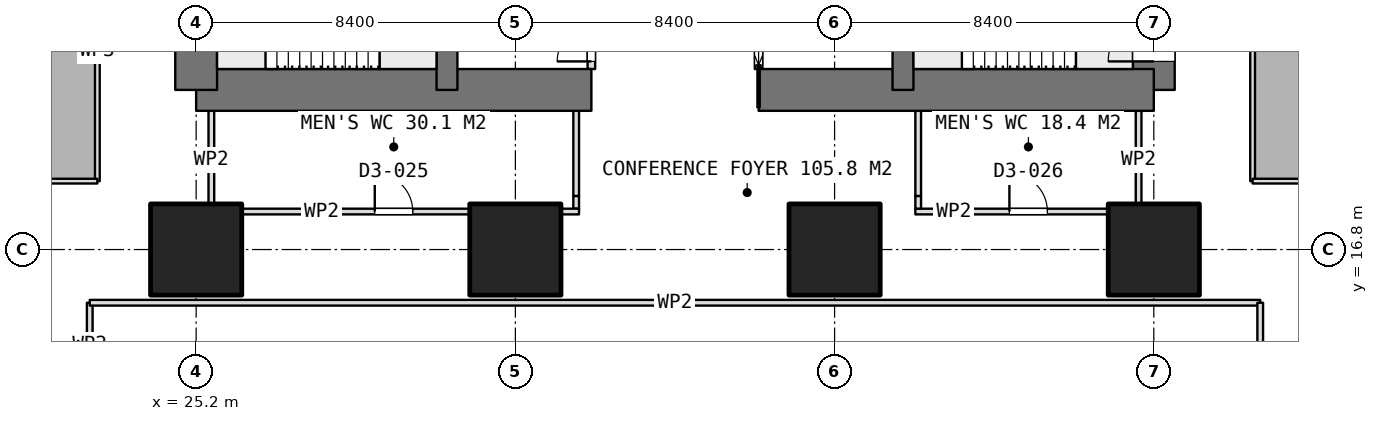
"""IFC4 building model, lengths in metres.
Left out: names, types, materials, properties, quantities, classifications, styles, units other than length and angle.
Written with IfcOpenShell. Run it as: python <this file> out.ifc"""

import sys

from ifc_helpers import new_model, si_unit, direction, frame, frame_2d, origin, origin_2d, place, context, subcontext, project, spatial, rectangle, extrude, element, fill, save


model = new_model("IFC4")
c1 = context("Model", 3, precision=1e-05, world=origin(), true_north=direction((0.0, 1.0)))
c2 = subcontext(c1, "Body", "Model", "MODEL_VIEW")
j1 = project(units=[si_unit("LENGTHUNIT", "METRE"), si_unit("PLANEANGLEUNIT", "RADIAN")], contexts=[c1])
p1 = place(None, origin())
s1 = spatial("IfcSite", under=j1, at=p1, CompositionType="ELEMENT")
p2 = place(p1, origin())
s2 = spatial("IfcBuilding", under=s1, at=p2, CompositionType="ELEMENT")
p3 = place(p2, frame((0.0, 0.0, 20.4)))
s3 = spatial("IfcBuildingStorey", under=s2, at=p3, CompositionType="ELEMENT", Elevation=20.4)
p4 = place(p3, frame((25.2, 21.0, 0.0), z_axis=(0.0, 0.0, 1.0), x_axis=(1.0, 0.0, 0.0)))
e1 = element("IfcWall", 1, at=p4, inside=s3, PredefinedType="SHEAR", context=c2, shape_type="SweptSolid", body=[
    extrude(rectangle(XDim=10.4, YDim=1.1, at=frame_2d((5.2, 0.0))), origin(), (0.0, 0.0, 1.0), 5.0),
])
p5 = place(p3, frame((40.0, 21.0, 0.0), z_axis=(0.0, 0.0, 1.0), x_axis=(1.0, 0.0, 0.0)))
e2 = element("IfcWall", 2, at=p5, inside=s3, PredefinedType="SHEAR", context=c2, shape_type="SweptSolid", body=[
    extrude(rectangle(XDim=10.4, YDim=1.1, at=frame_2d((5.2, 0.0))), origin(), (0.0, 0.0, 1.0), 5.0),
])
p6 = place(p3, frame((25.2, 21.0, 0.0), z_axis=(0.0, 0.0, 1.0), x_axis=(0.0, 1.0, 0.0)))
e3 = element("IfcWall", 3, at=p6, inside=s3, PredefinedType="SHEAR", context=c2, shape_type="SweptSolid", body=[
    extrude(rectangle(XDim=25.2, YDim=1.1, at=frame_2d((12.6, 0.0))), origin(), (0.0, 0.0, 1.0), 5.0),
])
p7 = place(p6, frame((7.8, 0.0, 0.0)))
e4 = element("IfcOpeningElement", 4, at=p7, cuts=e3, PredefinedType="OPENING", context=c2, shape_type="SweptSolid", body=[
    extrude(rectangle(XDim=1.2, YDim=2.1, at=frame_2d((0.6, 1.05))), frame((0.0, 0.56, 0.0), z_axis=(0.0, -1.0, 0.0), x_axis=(1.0, 0.0, 0.0)), (0.0, 0.0, 1.0), 1.12),
])
p8 = place(p6, frame((14.25, 0.0, 0.0)))
e5 = element("IfcOpeningElement", 5, at=p8, cuts=e3, PredefinedType="OPENING", context=c2, shape_type="SweptSolid", body=[
    extrude(rectangle(XDim=0.9, YDim=2.1, at=frame_2d((0.45, 1.05))), frame((0.0, 0.56, 0.0), z_axis=(0.0, -1.0, 0.0), x_axis=(1.0, 0.0, 0.0)), (0.0, 0.0, 1.0), 1.12),
])
p9 = place(p6, frame((16.85, 0.0, 0.0)))
e6 = element("IfcOpeningElement", 6, at=p9, cuts=e3, PredefinedType="OPENING", context=c2, shape_type="SweptSolid", body=[
    extrude(rectangle(XDim=0.9, YDim=2.1, at=frame_2d((0.45, 1.05))), frame((0.0, 0.56, 0.0), z_axis=(0.0, -1.0, 0.0), x_axis=(1.0, 0.0, 0.0)), (0.0, 0.0, 1.0), 1.12),
])
p10 = place(p6, frame((19.075, 0.0, 0.0)))
e7 = element("IfcOpeningElement", 7, at=p10, cuts=e3, PredefinedType="OPENING", context=c2, shape_type="SweptSolid", body=[
    extrude(rectangle(XDim=1.2, YDim=2.1, at=frame_2d((0.6, 1.05))), frame((0.0, 0.56, 0.0), z_axis=(0.0, -1.0, 0.0), x_axis=(1.0, 0.0, 0.0)), (0.0, 0.0, 1.0), 1.12),
])
p11 = place(p3, frame((50.4, 21.0, 0.0), z_axis=(0.0, 0.0, 1.0), x_axis=(0.0, 1.0, 0.0)))
e8 = element("IfcWall", 8, at=p11, inside=s3, PredefinedType="SHEAR", context=c2, shape_type="SweptSolid", body=[
    extrude(rectangle(XDim=25.2, YDim=1.1, at=frame_2d((12.6, 0.0))), origin(), (0.0, 0.0, 1.0), 5.0),
])
p12 = place(p11, frame((16.2, 0.0, 0.0)))
e9 = element("IfcOpeningElement", 9, at=p12, cuts=e8, PredefinedType="OPENING", context=c2, shape_type="SweptSolid", body=[
    extrude(rectangle(XDim=1.2, YDim=2.1, at=frame_2d((0.6, 1.05))), frame((0.0, 0.56, 0.0), z_axis=(0.0, -1.0, 0.0), x_axis=(1.0, 0.0, 0.0)), (0.0, 0.0, 1.0), 1.12),
])
p13 = place(p11, frame((10.05, 0.0, 0.0)))
e10 = element("IfcOpeningElement", 10, at=p13, cuts=e8, PredefinedType="OPENING", context=c2, shape_type="SweptSolid", body=[
    extrude(rectangle(XDim=0.9, YDim=2.1, at=frame_2d((0.45, 1.05))), frame((0.0, 0.56, 0.0), z_axis=(0.0, -1.0, 0.0), x_axis=(1.0, 0.0, 0.0)), (0.0, 0.0, 1.0), 1.12),
])
p14 = place(p11, frame((7.45, 0.0, 0.0)))
e11 = element("IfcOpeningElement", 11, at=p14, cuts=e8, PredefinedType="OPENING", context=c2, shape_type="SweptSolid", body=[
    extrude(rectangle(XDim=0.9, YDim=2.1, at=frame_2d((0.45, 1.05))), frame((0.0, 0.56, 0.0), z_axis=(0.0, -1.0, 0.0), x_axis=(1.0, 0.0, 0.0)), (0.0, 0.0, 1.0), 1.12),
])
p15 = place(p11, frame((0.75, 0.0, 0.0)))
e12 = element("IfcOpeningElement", 12, at=p15, cuts=e8, PredefinedType="OPENING", context=c2, shape_type="SweptSolid", body=[
    extrude(rectangle(XDim=1.2, YDim=2.1, at=frame_2d((0.6, 1.05))), frame((0.0, 0.56, 0.0), z_axis=(0.0, -1.0, 0.0), x_axis=(1.0, 0.0, 0.0)), (0.0, 0.0, 1.0), 1.12),
])
for number, where, z_axis, x_axis in (
    (13, (31.8, 21.0, 0.0), (0.0, 0.0, 1.0), (0.0, 1.0, 0.0)),
    (14, (43.8, 21.0, 0.0), (0.0, 0.0, 1.0), (0.0, 1.0, 0.0)),
):
    element("IfcWall", number, at=place(p3, frame(where, z_axis=z_axis, x_axis=x_axis)), inside=s3, PredefinedType="SHEAR", context=c2, shape_type="SweptSolid", body=[
        extrude(rectangle(XDim=25.2, YDim=0.55, at=frame_2d((12.6, 0.0))), origin(), (0.0, 0.0, 1.0), 5.0),
    ])
for number, where, z_axis, x_axis in (
    (15, (25.2, 16.8, 0.0), (0.0, 0.0, 1.0), (1.0, 0.0, 0.0)),
    (16, (33.6, 16.8, 0.0), (0.0, 0.0, 1.0), (1.0, 0.0, 0.0)),
    (17, (42.0, 16.8, 0.0), (0.0, 0.0, 1.0), (1.0, 0.0, 0.0)),
    (18, (50.4, 16.8, 0.0), (0.0, 0.0, 1.0), (1.0, 0.0, 0.0)),
):
    element("IfcColumn", number, at=place(p3, frame(where, z_axis=z_axis, x_axis=x_axis)), inside=s3, PredefinedType="COLUMN", context=c2, shape_type="SweptSolid", body=[
        extrude(rectangle(XDim=2.4, YDim=2.4, at=origin_2d()), origin(), (0.0, 0.0, 1.0), 5.0),
    ])
p16 = place(p3, frame((40.0, 21.55, 0.0), z_axis=(0.0, 0.0, 1.0), x_axis=(0.0, 1.0, 0.0)))
e19 = element("IfcWall", 19, at=p16, inside=s3, PredefinedType="PARTITIONING", context=c2, shape_type="SweptSolid", body=[
    extrude(rectangle(XDim=1.575, YDim=0.2, at=frame_2d((0.788, 0.0))), origin(), (0.0, 0.0, 1.0), 4.6),
])
p17 = place(p16, frame((0.1, 0.0, 0.0)))
e20 = element("IfcOpeningElement", 20, at=p17, cuts=e19, PredefinedType="OPENING", context=c2, shape_type="SweptSolid", body=[
    extrude(rectangle(XDim=1.1, YDim=2.1, at=frame_2d((0.55, 1.05))), frame((0.0, 0.11, 0.0), z_axis=(0.0, -1.0, 0.0), x_axis=(1.0, 0.0, 0.0)), (0.0, 0.0, 1.0), 0.22),
])
p18 = place(p3, frame((35.6, 21.55, 0.0), z_axis=(0.0, 0.0, 1.0), x_axis=(0.0, 1.0, 0.0)))
e21 = element("IfcWall", 21, at=p18, inside=s3, PredefinedType="PARTITIONING", context=c2, shape_type="SweptSolid", body=[
    extrude(rectangle(XDim=1.575, YDim=0.2, at=frame_2d((0.788, 0.0))), origin(), (0.0, 0.0, 1.0), 4.6),
])
p19 = place(p18, frame((0.2, 0.0, 0.0)))
e22 = element("IfcOpeningElement", 22, at=p19, cuts=e21, PredefinedType="OPENING", context=c2, shape_type="SweptSolid", body=[
    extrude(rectangle(XDim=0.9, YDim=2.1, at=frame_2d((0.45, 1.05))), frame((0.0, 0.11, 0.0), z_axis=(0.0, -1.0, 0.0), x_axis=(1.0, 0.0, 0.0)), (0.0, 0.0, 1.0), 0.22),
])
p20 = place(p3, frame((25.525, 17.8, 0.0), z_axis=(0.0, 0.0, 1.0), x_axis=(1.0, 0.0, 0.0)))
e23 = element("IfcWall", 23, at=p20, inside=s3, PredefinedType="PARTITIONING", context=c2, shape_type="SweptSolid", body=[
    extrude(rectangle(XDim=0.875, YDim=0.15, at=frame_2d((0.438, 0.0))), origin(), (0.0, 0.0, 1.0), 4.6),
])
p21 = place(p3, frame((26.4, 17.8, 0.0), z_axis=(0.0, 0.0, 1.0), x_axis=(1.0, 0.0, 0.0)))
e24 = element("IfcWall", 24, at=p21, inside=s3, PredefinedType="PARTITIONING", context=c2, shape_type="SweptSolid", body=[
    extrude(rectangle(XDim=6.0, YDim=0.15, at=frame_2d((3.0, 0.0))), origin(), (0.0, 0.0, 1.0), 2.8),
])
p22 = place(p21, frame((3.5, 0.0, 0.0)))
e25 = element("IfcOpeningElement", 25, at=p22, cuts=e24, PredefinedType="OPENING", context=c2, shape_type="SweptSolid", body=[
    extrude(rectangle(XDim=1.0, YDim=2.1, at=frame_2d((0.5, 1.05))), frame((0.0, 0.085, 0.0), z_axis=(0.0, -1.0, 0.0), x_axis=(1.0, 0.0, 0.0)), (0.0, 0.0, 1.0), 0.17),
])
p23 = place(p3, frame((32.4, 17.8, 0.0), z_axis=(0.0, 0.0, 1.0), x_axis=(1.0, 0.0, 0.0)))
e26 = element("IfcWall", 26, at=p23, inside=s3, PredefinedType="PARTITIONING", context=c2, shape_type="SweptSolid", body=[
    extrude(rectangle(XDim=2.4, YDim=0.15, at=frame_2d((1.2, 0.0))), origin(), (0.0, 0.0, 1.0), 4.6),
])
p24 = place(p3, frame((34.8, 17.8, 0.0), z_axis=(0.0, 0.0, 1.0), x_axis=(1.0, 0.0, 0.0)))
e27 = element("IfcWall", 27, at=p24, inside=s3, PredefinedType="PARTITIONING", context=c2, shape_type="SweptSolid", body=[
    extrude(rectangle(XDim=0.475, YDim=0.15, at=frame_2d((0.237, 0.0))), origin(), (0.0, 0.0, 1.0), 2.8),
])
p25 = place(p3, frame((25.6, 17.875, 0.0), z_axis=(0.0, 0.0, 1.0), x_axis=(0.0, 1.0, 0.0)))
e28 = element("IfcWall", 28, at=p25, inside=s3, PredefinedType="PARTITIONING", context=c2, shape_type="SweptSolid", body=[
    extrude(rectangle(XDim=2.575, YDim=0.15, at=frame_2d((1.288, 0.0))), origin(), (0.0, 0.0, 1.0), 4.6),
])
p26 = place(p3, frame((35.2, 17.875, 0.0), z_axis=(0.0, 0.0, 1.0), x_axis=(0.0, 1.0, 0.0)))
e29 = element("IfcWall", 29, at=p26, inside=s3, PredefinedType="PARTITIONING", context=c2, shape_type="SweptSolid", body=[
    extrude(rectangle(XDim=0.335, YDim=0.15, at=frame_2d((0.167, 0.0))), origin(), (0.0, 0.0, 1.0), 2.8),
])
p27 = place(p3, frame((35.2, 18.21, 0.0), z_axis=(0.0, 0.0, 1.0), x_axis=(0.0, 1.0, 0.0)))
e30 = element("IfcWall", 30, at=p27, inside=s3, PredefinedType="PARTITIONING", context=c2, shape_type="SweptSolid", body=[
    extrude(rectangle(XDim=2.24, YDim=0.15, at=frame_2d((1.12, 0.0))), origin(), (0.0, 0.0, 1.0), 4.6),
])
p28 = place(p3, frame((44.125, 17.8, 0.0), z_axis=(0.0, 0.0, 1.0), x_axis=(1.0, 0.0, 0.0)))
e31 = element("IfcWall", 31, at=p28, inside=s3, PredefinedType="PARTITIONING", context=c2, shape_type="SweptSolid", body=[
    extrude(rectangle(XDim=5.075, YDim=0.15, at=frame_2d((2.538, 0.0))), origin(), (0.0, 0.0, 1.0), 2.8),
])
p29 = place(p28, frame((2.475, 0.0, 0.0)))
e32 = element("IfcOpeningElement", 32, at=p29, cuts=e31, PredefinedType="OPENING", context=c2, shape_type="SweptSolid", body=[
    extrude(rectangle(XDim=1.0, YDim=2.1, at=frame_2d((0.5, 1.05))), frame((0.0, 0.085, 0.0), z_axis=(0.0, -1.0, 0.0), x_axis=(1.0, 0.0, 0.0)), (0.0, 0.0, 1.0), 0.17),
])
p30 = place(p3, frame((49.2, 17.8, 0.0), z_axis=(0.0, 0.0, 1.0), x_axis=(1.0, 0.0, 0.0)))
e33 = element("IfcWall", 33, at=p30, inside=s3, PredefinedType="PARTITIONING", context=c2, shape_type="SweptSolid", body=[
    extrude(rectangle(XDim=0.875, YDim=0.15, at=frame_2d((0.438, 0.0))), origin(), (0.0, 0.0, 1.0), 4.6),
])
p31 = place(p3, frame((44.2, 17.875, 0.0), z_axis=(0.0, 0.0, 1.0), x_axis=(0.0, 1.0, 0.0)))
e34 = element("IfcWall", 34, at=p31, inside=s3, PredefinedType="PARTITIONING", context=c2, shape_type="SweptSolid", body=[
    extrude(rectangle(XDim=0.335, YDim=0.15, at=frame_2d((0.167, 0.0))), origin(), (0.0, 0.0, 1.0), 2.8),
])
p32 = place(p3, frame((44.2, 18.21, 0.0), z_axis=(0.0, 0.0, 1.0), x_axis=(0.0, 1.0, 0.0)))
e35 = element("IfcWall", 35, at=p32, inside=s3, PredefinedType="PARTITIONING", context=c2, shape_type="SweptSolid", body=[
    extrude(rectangle(XDim=2.24, YDim=0.15, at=frame_2d((1.12, 0.0))), origin(), (0.0, 0.0, 1.0), 4.6),
])
p33 = place(p3, frame((50.0, 17.875, 0.0), z_axis=(0.0, 0.0, 1.0), x_axis=(0.0, 1.0, 0.0)))
e36 = element("IfcWall", 36, at=p33, inside=s3, PredefinedType="PARTITIONING", context=c2, shape_type="SweptSolid", body=[
    extrude(rectangle(XDim=2.575, YDim=0.15, at=frame_2d((1.288, 0.0))), origin(), (0.0, 0.0, 1.0), 4.6),
])
p34 = place(p3, frame((22.4, 9.81, 0.0), z_axis=(0.0, 0.0, 1.0), x_axis=(0.0, 1.0, 0.0)))
e37 = element("IfcWall", 37, at=p34, inside=s3, PredefinedType="PARTITIONING", context=c2, shape_type="SweptSolid", body=[
    extrude(rectangle(XDim=5.59, YDim=0.15, at=frame_2d((2.795, 0.0))), origin(), (0.0, 0.0, 1.0), 2.8),
])
p35 = place(p34, frame((1.063, 0.0, 0.0)))
e38 = element("IfcOpeningElement", 38, at=p35, cuts=e37, PredefinedType="OPENING", context=c2, shape_type="SweptSolid", body=[
    extrude(rectangle(XDim=1.8, YDim=2.1, at=frame_2d((0.9, 1.05))), frame((0.0, 0.085, 0.0), z_axis=(0.0, -1.0, 0.0), x_axis=(1.0, 0.0, 0.0)), (0.0, 0.0, 1.0), 0.17),
])
p36 = place(p3, frame((22.4, 15.4, 0.0), z_axis=(0.0, 0.0, 1.0), x_axis=(1.0, 0.0, 0.0)))
e39 = element("IfcWall", 39, at=p36, inside=s3, PredefinedType="PARTITIONING", context=c2, shape_type="SweptSolid", body=[
    extrude(rectangle(XDim=30.8, YDim=0.15, at=frame_2d((15.4, 0.0))), origin(), (0.0, 0.0, 1.0), 2.8),
])
p37 = place(p3, frame((53.2, 15.4, 0.0), z_axis=(0.0, 0.0, 1.0), x_axis=(0.0, -1.0, 0.0)))
e40 = element("IfcWall", 40, at=p37, inside=s3, PredefinedType="PARTITIONING", context=c2, shape_type="SweptSolid", body=[
    extrude(rectangle(XDim=5.59, YDim=0.15, at=frame_2d((2.795, 0.0))), origin(), (0.0, 0.0, 1.0), 2.8),
])
p38 = place(p3, frame((22.6, 28.4, 0.0), z_axis=(0.0, 0.0, 1.0), x_axis=(0.0, -1.0, 0.0)))
e41 = element("IfcWall", 41, at=p38, inside=s3, PredefinedType="PARTITIONING", context=c2, shape_type="SweptSolid", body=[
    extrude(rectangle(XDim=9.8, YDim=0.125, at=frame_2d((4.9, 0.0))), origin(), (0.0, 0.0, 1.0), 4.6),
])
p39 = place(p38, frame((4.4, 0.0, 0.0)))
e42 = element("IfcOpeningElement", 42, at=p39, cuts=e41, PredefinedType="OPENING", context=c2, shape_type="SweptSolid", body=[
    extrude(rectangle(XDim=1.0, YDim=2.1, at=frame_2d((0.5, 1.05))), frame((0.0, 0.073, 0.0), z_axis=(0.0, -1.0, 0.0), x_axis=(1.0, 0.0, 0.0)), (0.0, 0.0, 1.0), 0.145),
])
p40 = place(p3, frame((22.6, 18.6, 0.0), z_axis=(0.0, 0.0, 1.0), x_axis=(-1.0, 0.0, 0.0)))
e43 = element("IfcWall", 43, at=p40, inside=s3, PredefinedType="PARTITIONING", context=c2, shape_type="SweptSolid", body=[
    extrude(rectangle(XDim=4.39, YDim=0.125, at=frame_2d((2.195, 0.0))), origin(), (0.0, 0.0, 1.0), 4.6),
])
p41 = place(p3, frame((53.0, 18.6, 0.0), z_axis=(0.0, 0.0, 1.0), x_axis=(0.0, 1.0, 0.0)))
e44 = element("IfcWall", 44, at=p41, inside=s3, PredefinedType="PARTITIONING", context=c2, shape_type="SweptSolid", body=[
    extrude(rectangle(XDim=9.8, YDim=0.125, at=frame_2d((4.9, 0.0))), origin(), (0.0, 0.0, 1.0), 4.6),
])
p42 = place(p3, frame((57.39, 18.6, 0.0), z_axis=(0.0, 0.0, 1.0), x_axis=(-1.0, 0.0, 0.0)))
e45 = element("IfcWall", 45, at=p42, inside=s3, PredefinedType="PARTITIONING", context=c2, shape_type="SweptSolid", body=[
    extrude(rectangle(XDim=4.39, YDim=0.125, at=frame_2d((2.195, 0.0))), origin(), (0.0, 0.0, 1.0), 4.6),
])
p43 = place(p17, origin())
e46 = element("IfcDoor", 46, at=p43, inside=s3, OperationType="SLIDING_TO_LEFT", PredefinedType="DOOR", context=c2, shape_type="SweptSolid", body=[
    extrude(rectangle(XDim=1.1, YDim=2.1, at=frame_2d((0.55, 1.05))), frame((0.0, 0.025, 0.0), z_axis=(0.0, -1.0, 0.0), x_axis=(1.0, 0.0, 0.0)), (0.0, 0.0, 1.0), 0.05),
])
fill(e20, e46)
p44 = place(p19, origin())
e47 = element("IfcDoor", 47, at=p44, inside=s3, OperationType="SINGLE_SWING_LEFT", PredefinedType="DOOR", context=c2, shape_type="SweptSolid", body=[
    extrude(rectangle(XDim=0.9, YDim=2.1, at=frame_2d((0.45, 1.05))), frame((0.0, 0.025, 0.0), z_axis=(0.0, -1.0, 0.0), x_axis=(1.0, 0.0, 0.0)), (0.0, 0.0, 1.0), 0.05),
])
fill(e22, e47)
p45 = place(p22, origin())
e48 = element("IfcDoor", 48, at=p45, inside=s3, OperationType="SINGLE_SWING_LEFT", PredefinedType="DOOR", context=c2, shape_type="SweptSolid", body=[
    extrude(rectangle(XDim=1.0, YDim=2.1, at=frame_2d((0.5, 1.05))), frame((0.0, 0.025, 0.0), z_axis=(0.0, -1.0, 0.0), x_axis=(1.0, 0.0, 0.0)), (0.0, 0.0, 1.0), 0.05),
])
fill(e25, e48)
p46 = place(p29, origin())
e49 = element("IfcDoor", 49, at=p46, inside=s3, OperationType="SINGLE_SWING_LEFT", PredefinedType="DOOR", context=c2, shape_type="SweptSolid", body=[
    extrude(rectangle(XDim=1.0, YDim=2.1, at=frame_2d((0.5, 1.05))), frame((0.0, 0.025, 0.0), z_axis=(0.0, -1.0, 0.0), x_axis=(1.0, 0.0, 0.0)), (0.0, 0.0, 1.0), 0.05),
])
fill(e32, e49)
p47 = place(p15, origin())
e50 = element("IfcDoor", 50, at=p47, inside=s3, OperationType="SINGLE_SWING_RIGHT", PredefinedType="DOOR", context=c2, shape_type="SweptSolid", body=[
    extrude(rectangle(XDim=1.2, YDim=2.1, at=frame_2d((0.6, 1.05))), frame((0.0, 0.025, 0.0), z_axis=(0.0, -1.0, 0.0), x_axis=(1.0, 0.0, 0.0)), (0.0, 0.0, 1.0), 0.05),
])
fill(e12, e50)
save(model, sys.argv[1])
